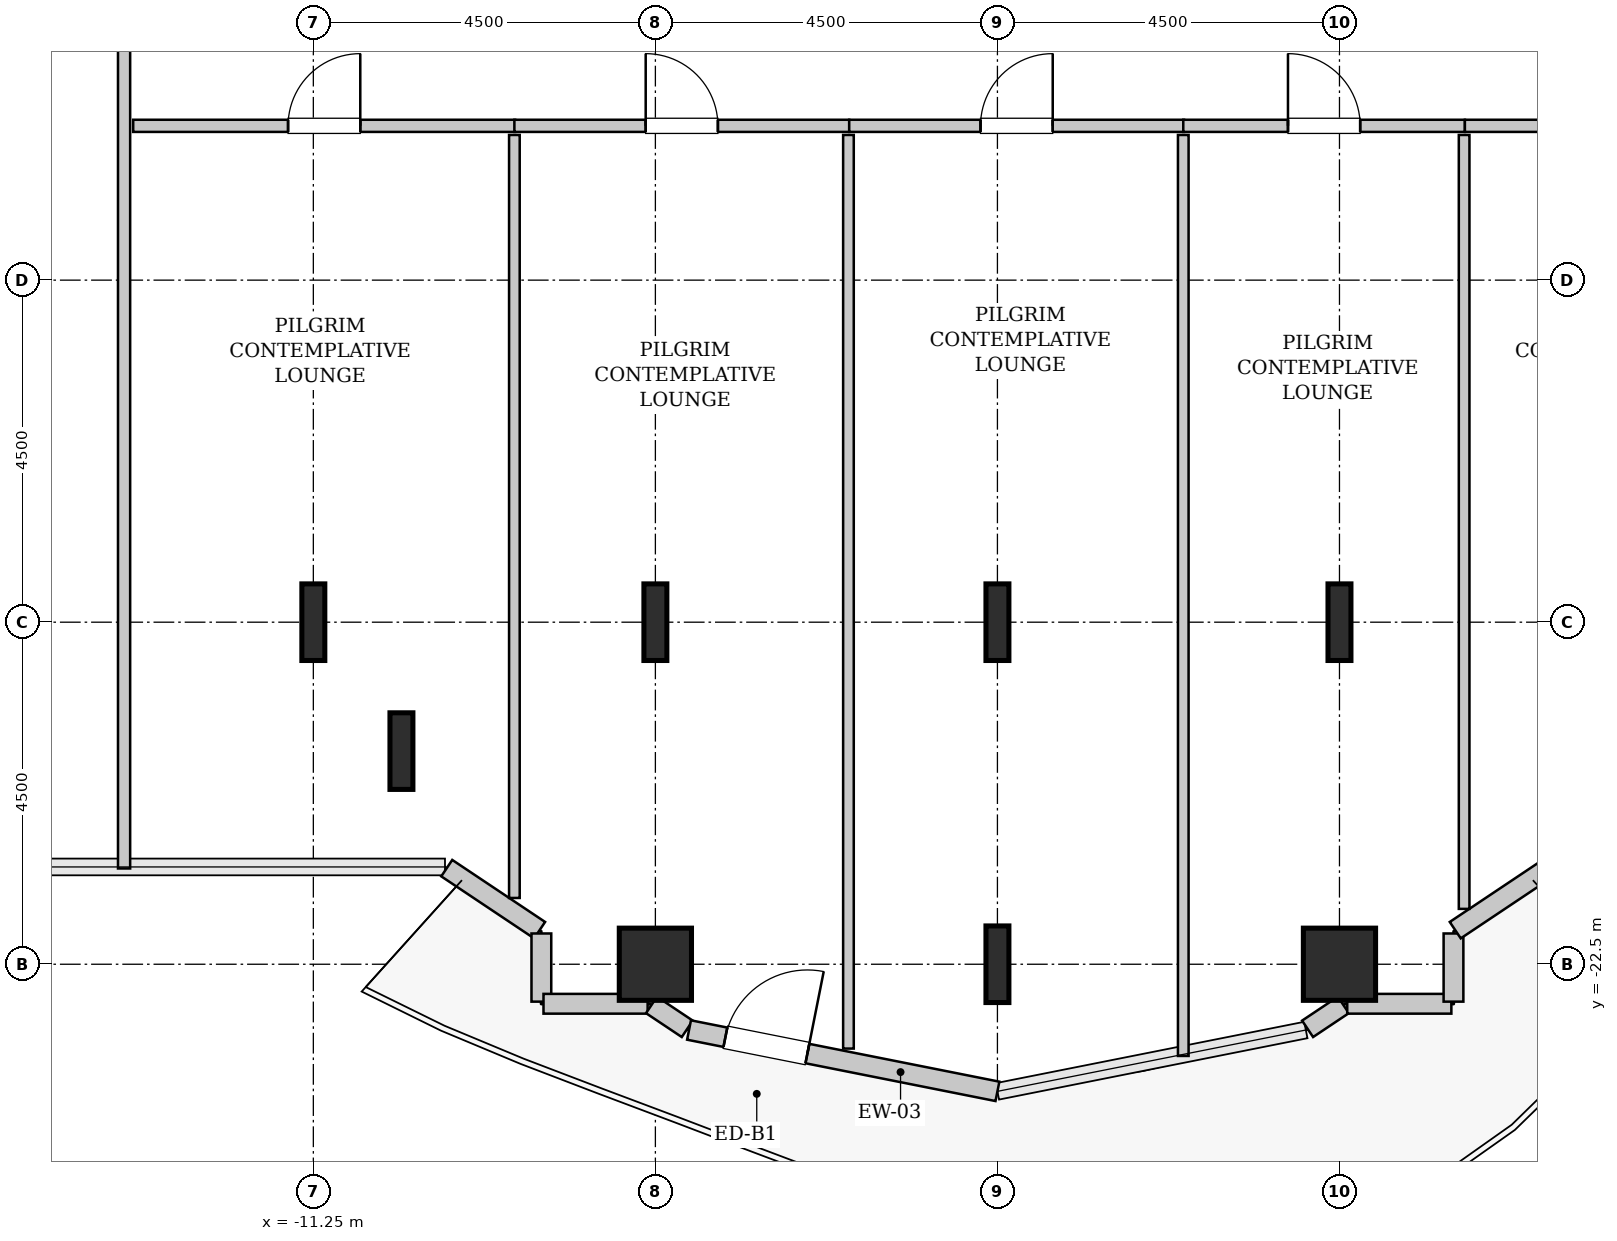
"""IFC4 building model, lengths in metres.
Left out: names, types, materials, properties, quantities, classifications, styles, units other than length and angle.
Written with IfcOpenShell. Run it as: python <this file> out.ifc"""

import sys

from ifc_helpers import new_model, si_unit, direction, frame, frame_2d, origin, origin_2d, place, context, subcontext, project, spatial, rectangle, hollow_rectangle, i_section, extrude, source, transform, mapped, element, fill, save


model = new_model("IFC4")
c1 = context("Model", 3, precision=1e-05, world=origin(), true_north=direction((0.0, 1.0)))
c2 = subcontext(c1, "Body", "Model", "MODEL_VIEW")
j1 = project(units=[si_unit("LENGTHUNIT", "METRE"), si_unit("PLANEANGLEUNIT", "RADIAN")], contexts=[c1])
p1 = place(None, origin())
s1 = spatial("IfcSite", under=j1, at=p1, CompositionType="ELEMENT")
p2 = place(p1, origin())
s2 = spatial("IfcBuilding", under=s1, at=p2, CompositionType="ELEMENT")
p3 = place(p2, frame((0.0, 0.0, 44.4)))
s3 = spatial("IfcBuildingStorey", under=s2, at=p3, CompositionType="ELEMENT", Elevation=44.4)
m1 = source(origin(), c2, "Body", "SweptSolid", [
    extrude(i_section(OverallWidth=0.302, OverallDepth=1.008, WebThickness=0.021, FlangeThickness=0.04, FilletRadius=0.03, at=origin_2d()), origin(), (0.0, 0.0, 1.0), 3.8),
])
for number, where, z_axis, x_axis in (
    (1, (-11.25, -18.0, 0.0), (0.0, 0.0, 1.0), (1.0, 0.0, 0.0)),
    (2, (-10.091, -19.696, 0.0), (0.0, 0.0, 1.0), (1.0, 0.0, 0.0)),
):
    element("IfcColumn", number, at=place(p3, frame(where, z_axis=z_axis, x_axis=x_axis)), inside=s3, PredefinedType="COLUMN", context=c2, shape_type="MappedRepresentation", body=[
        mapped(m1, transform((0.0, 0.0, 0.0), x_axis=(1.0, 0.0, 0.0), y_axis=(0.0, 1.0, 0.0), z_axis=(0.0, 0.0, 1.0), scale=1.0)),
    ])
m2 = source(origin(), c2, "Body", "SweptSolid", [
    extrude(hollow_rectangle(XDim=0.95, YDim=0.95, WallThickness=0.045, InnerFilletRadius=0.045, OuterFilletRadius=0.09, at=origin_2d()), origin(), (0.0, 0.0, 1.0), 3.8),
])
p4 = place(p3, frame((-6.75, -22.5, 0.0), z_axis=(0.0, 0.0, 1.0), x_axis=(1.0, 0.0, 0.0)))
e3 = element("IfcColumn", 3, at=p4, inside=s3, PredefinedType="COLUMN", context=c2, shape_type="MappedRepresentation", body=[
    mapped(m2, transform((0.0, 0.0, 0.0), x_axis=(1.0, 0.0, 0.0), y_axis=(0.0, 1.0, 0.0), z_axis=(0.0, 0.0, 1.0), scale=1.0)),
])
for number, where, z_axis, x_axis in (
    (4, (-6.75, -18.0, 0.0), (0.0, 0.0, 1.0), (1.0, 0.0, 0.0)),
    (5, (-2.25, -22.5, 0.0), (0.0, 0.0, 1.0), (1.0, 0.0, 0.0)),
    (6, (-2.25, -18.0, 0.0), (0.0, 0.0, 1.0), (1.0, 0.0, 0.0)),
):
    element("IfcColumn", number, at=place(p3, frame(where, z_axis=z_axis, x_axis=x_axis)), inside=s3, PredefinedType="COLUMN", context=c2, shape_type="MappedRepresentation", body=[
        mapped(m1, transform((0.0, 0.0, 0.0), x_axis=(1.0, 0.0, 0.0), y_axis=(0.0, 1.0, 0.0), z_axis=(0.0, 0.0, 1.0), scale=1.0)),
    ])
p5 = place(p3, frame((2.25, -22.5, 0.0), z_axis=(0.0, 0.0, 1.0), x_axis=(1.0, 0.0, 0.0)))
e7 = element("IfcColumn", 7, at=p5, inside=s3, PredefinedType="COLUMN", context=c2, shape_type="MappedRepresentation", body=[
    mapped(m2, transform((0.0, 0.0, 0.0), x_axis=(1.0, 0.0, 0.0), y_axis=(0.0, 1.0, 0.0), z_axis=(0.0, 0.0, 1.0), scale=1.0)),
])
p6 = place(p3, frame((2.25, -18.0, 0.0), z_axis=(0.0, 0.0, 1.0), x_axis=(1.0, 0.0, 0.0)))
e8 = element("IfcColumn", 8, at=p6, inside=s3, PredefinedType="COLUMN", context=c2, shape_type="MappedRepresentation", body=[
    mapped(m1, transform((0.0, 0.0, 0.0), x_axis=(1.0, 0.0, 0.0), y_axis=(0.0, 1.0, 0.0), z_axis=(0.0, 0.0, 1.0), scale=1.0)),
])
m3 = source(origin(), c2, "Body", "SweptSolid", [
    extrude(rectangle(XDim=1.469, YDim=0.26, at=frame_2d((0.734, 0.0))), origin(), (0.0, 0.0, 1.0), 3.55),
])
p7 = place(p3, frame((-9.495, -21.236, 0.0), z_axis=(0.0, 0.0, 1.0), x_axis=(0.831461760506, -0.555581983884, 0.0)))
e9 = element("IfcWall", 9, at=p7, inside=s3, PredefinedType="SOLIDWALL", context=c2, shape_type="MappedRepresentation", body=[
    mapped(m3, transform((0.0, 0.0, 0.0), x_axis=(1.0, 0.0, 0.0), y_axis=(0.0, 1.0, 0.0), z_axis=(0.0, 0.0, 1.0), scale=1.0)),
])
m4 = source(origin(), c2, "Body", "SweptSolid", [
    extrude(rectangle(XDim=0.897, YDim=0.26, at=frame_2d((0.448, 0.0))), origin(), (0.0, 0.0, 1.0), 3.55),
])
p8 = place(p3, frame((-8.25, -22.095, 0.0), z_axis=(0.0, 0.0, 1.0), x_axis=(0.0, -1.0, 0.0)))
e10 = element("IfcWall", 10, at=p8, inside=s3, PredefinedType="SOLIDWALL", context=c2, shape_type="MappedRepresentation", body=[
    mapped(m4, transform((0.0, 0.0, 0.0), x_axis=(1.0, 0.0, 0.0), y_axis=(0.0, 1.0, 0.0), z_axis=(0.0, 0.0, 1.0), scale=1.0)),
])
m5 = source(origin(), c2, "Body", "SweptSolid", [
    extrude(rectangle(XDim=1.37, YDim=0.26, at=frame_2d((0.685, 0.0))), origin(), (0.0, 0.0, 1.0), 3.55),
])
p9 = place(p3, frame((-8.222, -23.02, 0.0), z_axis=(0.0, 0.0, 1.0), x_axis=(1.0, 0.0, 0.0)))
e11 = element("IfcWall", 11, at=p9, inside=s3, PredefinedType="SOLIDWALL", context=c2, shape_type="MappedRepresentation", body=[
    mapped(m5, transform((0.0, 0.0, 0.0), x_axis=(1.0, 0.0, 0.0), y_axis=(0.0, 1.0, 0.0), z_axis=(0.0, 0.0, 1.0), scale=1.0)),
])
m6 = source(origin(), c2, "Body", "SweptSolid", [
    extrude(rectangle(XDim=0.565, YDim=0.26, at=frame_2d((0.283, 0.0))), origin(), (0.0, 0.0, 1.0), 3.55),
])
p10 = place(p3, frame((-6.801, -23.036, 0.0), z_axis=(0.0, 0.0, 1.0), x_axis=(0.831651492666, -0.555297933317, 0.0)))
e12 = element("IfcWall", 12, at=p10, inside=s3, PredefinedType="SOLIDWALL", context=c2, shape_type="MappedRepresentation", body=[
    mapped(m6, transform((0.0, 0.0, 0.0), x_axis=(1.0, 0.0, 0.0), y_axis=(0.0, 1.0, 0.0), z_axis=(0.0, 0.0, 1.0), scale=1.0)),
])
m7 = source(origin(), c2, "Body", "SweptSolid", [
    extrude(rectangle(XDim=4.137, YDim=0.26, at=frame_2d((2.068, 0.0))), origin(), (0.0, 0.0, 1.0), 3.55),
])
p11 = place(p3, frame((-6.307, -23.365, 0.0), z_axis=(0.0, 0.0, 1.0), x_axis=(0.980782170794, -0.195105954428, 0.0)))
e13 = element("IfcWall", 13, at=p11, inside=s3, PredefinedType="SOLIDWALL", context=c2, shape_type="MappedRepresentation", body=[
    mapped(m7, transform((0.0, 0.0, 0.0), x_axis=(1.0, 0.0, 0.0), y_axis=(0.0, 1.0, 0.0), z_axis=(0.0, 0.0, 1.0), scale=1.0)),
])
p12 = place(p11, frame((0.488, 0.0, 0.0)))
e14 = element("IfcOpeningElement", 14, at=p12, cuts=e13, PredefinedType="OPENING", context=c2, shape_type="SweptSolid", body=[
    extrude(rectangle(XDim=1.1, YDim=2.2, at=frame_2d((0.55, 1.1))), frame((0.0, 0.14, 0.0), z_axis=(0.0, -1.0, 0.0), x_axis=(1.0, 0.0, 0.0)), (0.0, 0.0, 1.0), 0.28),
])
p13 = place(p3, frame((1.831, -23.35, 0.0), z_axis=(0.0, 0.0, 1.0), x_axis=(0.831651492666, 0.555297933317, 0.0)))
e15 = element("IfcWall", 15, at=p13, inside=s3, PredefinedType="SOLIDWALL", context=c2, shape_type="MappedRepresentation", body=[
    mapped(m6, transform((0.0, 0.0, 0.0), x_axis=(1.0, 0.0, 0.0), y_axis=(0.0, 1.0, 0.0), z_axis=(0.0, 0.0, 1.0), scale=1.0)),
])
p14 = place(p3, frame((2.352, -23.02, 0.0), z_axis=(0.0, 0.0, 1.0), x_axis=(1.0, 0.0, 0.0)))
e16 = element("IfcWall", 16, at=p14, inside=s3, PredefinedType="SOLIDWALL", context=c2, shape_type="MappedRepresentation", body=[
    mapped(m5, transform((0.0, 0.0, 0.0), x_axis=(1.0, 0.0, 0.0), y_axis=(0.0, 1.0, 0.0), z_axis=(0.0, 0.0, 1.0), scale=1.0)),
])
p15 = place(p3, frame((3.75, -22.992, 0.0), z_axis=(0.0, 0.0, 1.0), x_axis=(0.0, 1.0, 0.0)))
e17 = element("IfcWall", 17, at=p15, inside=s3, PredefinedType="SOLIDWALL", context=c2, shape_type="MappedRepresentation", body=[
    mapped(m4, transform((0.0, 0.0, 0.0), x_axis=(1.0, 0.0, 0.0), y_axis=(0.0, 1.0, 0.0), z_axis=(0.0, 0.0, 1.0), scale=1.0)),
])
p16 = place(p3, frame((3.773, -22.052, 0.0), z_axis=(0.0, 0.0, 1.0), x_axis=(0.831461760506, 0.555581983884, 0.0)))
e18 = element("IfcWall", 18, at=p16, inside=s3, PredefinedType="SOLIDWALL", context=c2, shape_type="MappedRepresentation", body=[
    mapped(m3, transform((0.0, 0.0, 0.0), x_axis=(1.0, 0.0, 0.0), y_axis=(0.0, 1.0, 0.0), z_axis=(0.0, 0.0, 1.0), scale=1.0)),
])
m8 = source(origin(), c2, "Body", "SweptSolid", [
    extrude(rectangle(XDim=12.745, YDim=0.16, at=frame_2d((6.373, 0.0))), origin(), (0.0, 0.0, 1.0), 3.535),
])
p17 = place(p3, frame((-13.74, -21.24, 0.0), z_axis=(0.0, 0.0, 1.0), x_axis=(0.0, 1.0, 0.0)))
e19 = element("IfcWall", 19, at=p17, inside=s3, PredefinedType="PARTITIONING", context=c2, shape_type="MappedRepresentation", body=[
    mapped(m8, transform((0.0, 0.0, 0.0), x_axis=(1.0, 0.0, 0.0), y_axis=(0.0, 1.0, 0.0), z_axis=(0.0, 0.0, 1.0), scale=1.0)),
])
p18 = place(p17, frame((10.762, 0.0, 0.0)))
e20 = element("IfcOpeningElement", 20, at=p18, cuts=e19, PredefinedType="OPENING", context=c2, shape_type="SweptSolid", body=[
    extrude(rectangle(XDim=0.95, YDim=2.1, at=frame_2d((0.475, 1.05))), frame((0.0, 0.09, 0.0), z_axis=(0.0, -1.0, 0.0), x_axis=(1.0, 0.0, 0.0)), (0.0, 0.0, 1.0), 0.18),
])
m9 = source(origin(), c2, "Body", "SweptSolid", [
    extrude(rectangle(XDim=5.025, YDim=0.16, at=frame_2d((2.513, 0.0))), origin(), (0.0, 0.0, 1.0), 3.535),
])
p19 = place(p3, frame((-13.62, -11.47, 0.0), z_axis=(0.0, 0.0, 1.0), x_axis=(1.0, 0.0, 0.0)))
e21 = element("IfcWall", 21, at=p19, inside=s3, PredefinedType="PARTITIONING", context=c2, shape_type="MappedRepresentation", body=[
    mapped(m9, transform((0.0, 0.0, 0.0), x_axis=(1.0, 0.0, 0.0), y_axis=(0.0, 1.0, 0.0), z_axis=(0.0, 0.0, 1.0), scale=1.0)),
])
p20 = place(p19, frame((2.038, 0.0, 0.0)))
e22 = element("IfcOpeningElement", 22, at=p20, cuts=e21, PredefinedType="OPENING", context=c2, shape_type="SweptSolid", body=[
    extrude(rectangle(XDim=0.95, YDim=2.1, at=frame_2d((0.475, 1.05))), frame((0.0, 0.09, 0.0), z_axis=(0.0, -1.0, 0.0), x_axis=(1.0, 0.0, 0.0)), (0.0, 0.0, 1.0), 0.18),
])
m10 = source(origin(), c2, "Body", "SweptSolid", [
    extrude(rectangle(XDim=10.038, YDim=0.14, at=frame_2d((5.019, 0.0))), origin(), (0.0, 0.0, 1.0), 3.535),
])
p21 = place(p3, frame((-8.605, -21.628, 0.0), z_axis=(0.0, 0.0, 1.0), x_axis=(0.0, 1.0, 0.0)))
e23 = element("IfcWall", 23, at=p21, inside=s3, PredefinedType="PARTITIONING", context=c2, shape_type="MappedRepresentation", body=[
    mapped(m10, transform((0.0, 0.0, 0.0), x_axis=(1.0, 0.0, 0.0), y_axis=(0.0, 1.0, 0.0), z_axis=(0.0, 0.0, 1.0), scale=1.0)),
])
m11 = source(origin(), c2, "Body", "SweptSolid", [
    extrude(rectangle(XDim=4.405, YDim=0.16, at=frame_2d((2.203, 0.0))), origin(), (0.0, 0.0, 1.0), 3.535),
])
p22 = place(p3, frame((-8.605, -11.47, 0.0), z_axis=(0.0, 0.0, 1.0), x_axis=(1.0, 0.0, 0.0)))
e24 = element("IfcWall", 24, at=p22, inside=s3, PredefinedType="PARTITIONING", context=c2, shape_type="MappedRepresentation", body=[
    mapped(m11, transform((0.0, 0.0, 0.0), x_axis=(1.0, 0.0, 0.0), y_axis=(0.0, 1.0, 0.0), z_axis=(0.0, 0.0, 1.0), scale=1.0)),
])
p23 = place(p22, frame((1.728, 0.0, 0.0)))
e25 = element("IfcOpeningElement", 25, at=p23, cuts=e24, PredefinedType="OPENING", context=c2, shape_type="SweptSolid", body=[
    extrude(rectangle(XDim=0.95, YDim=2.1, at=frame_2d((0.475, 1.05))), frame((0.0, 0.09, 0.0), z_axis=(0.0, -1.0, 0.0), x_axis=(1.0, 0.0, 0.0)), (0.0, 0.0, 1.0), 0.18),
])
m12 = source(origin(), c2, "Body", "SweptSolid", [
    extrude(rectangle(XDim=12.019, YDim=0.14, at=frame_2d((6.01, 0.0))), origin(), (0.0, 0.0, 1.0), 3.535),
])
p24 = place(p3, frame((-4.21, -23.609, 0.0), z_axis=(0.0, 0.0, 1.0), x_axis=(0.0, 1.0, 0.0)))
e26 = element("IfcWall", 26, at=p24, inside=s3, PredefinedType="PARTITIONING", context=c2, shape_type="MappedRepresentation", body=[
    mapped(m12, transform((0.0, 0.0, 0.0), x_axis=(1.0, 0.0, 0.0), y_axis=(0.0, 1.0, 0.0), z_axis=(0.0, 0.0, 1.0), scale=1.0)),
])
p25 = place(p3, frame((-4.2, -11.47, 0.0), z_axis=(0.0, 0.0, 1.0), x_axis=(1.0, 0.0, 0.0)))
e27 = element("IfcWall", 27, at=p25, inside=s3, PredefinedType="PARTITIONING", context=c2, shape_type="MappedRepresentation", body=[
    mapped(m11, transform((0.0, 0.0, 0.0), x_axis=(1.0, 0.0, 0.0), y_axis=(0.0, 1.0, 0.0), z_axis=(0.0, 0.0, 1.0), scale=1.0)),
])
p26 = place(p25, frame((1.728, 0.0, 0.0)))
e28 = element("IfcOpeningElement", 28, at=p26, cuts=e27, PredefinedType="OPENING", context=c2, shape_type="SweptSolid", body=[
    extrude(rectangle(XDim=0.95, YDim=2.1, at=frame_2d((0.475, 1.05))), frame((0.0, 0.09, 0.0), z_axis=(0.0, -1.0, 0.0), x_axis=(1.0, 0.0, 0.0)), (0.0, 0.0, 1.0), 0.18),
])
m13 = source(origin(), c2, "Body", "SweptSolid", [
    extrude(rectangle(XDim=12.116, YDim=0.14, at=frame_2d((6.058, 0.0))), origin(), (0.0, 0.0, 1.0), 3.535),
])
p27 = place(p3, frame((0.195, -23.706, 0.0), z_axis=(0.0, 0.0, 1.0), x_axis=(0.0, 1.0, 0.0)))
e29 = element("IfcWall", 29, at=p27, inside=s3, PredefinedType="PARTITIONING", context=c2, shape_type="MappedRepresentation", body=[
    mapped(m13, transform((0.0, 0.0, 0.0), x_axis=(1.0, 0.0, 0.0), y_axis=(0.0, 1.0, 0.0), z_axis=(0.0, 0.0, 1.0), scale=1.0)),
])
m14 = source(origin(), c2, "Body", "SweptSolid", [
    extrude(rectangle(XDim=3.705, YDim=0.16, at=frame_2d((1.853, 0.0))), origin(), (0.0, 0.0, 1.0), 3.535),
])
p28 = place(p3, frame((0.195, -11.47, 0.0), z_axis=(0.0, 0.0, 1.0), x_axis=(1.0, 0.0, 0.0)))
e30 = element("IfcWall", 30, at=p28, inside=s3, PredefinedType="PARTITIONING", context=c2, shape_type="MappedRepresentation", body=[
    mapped(m14, transform((0.0, 0.0, 0.0), x_axis=(1.0, 0.0, 0.0), y_axis=(0.0, 1.0, 0.0), z_axis=(0.0, 0.0, 1.0), scale=1.0)),
])
p29 = place(p28, frame((1.377, 0.0, 0.0)))
e31 = element("IfcOpeningElement", 31, at=p29, cuts=e30, PredefinedType="OPENING", context=c2, shape_type="SweptSolid", body=[
    extrude(rectangle(XDim=0.95, YDim=2.1, at=frame_2d((0.475, 1.05))), frame((0.0, 0.09, 0.0), z_axis=(0.0, -1.0, 0.0), x_axis=(1.0, 0.0, 0.0)), (0.0, 0.0, 1.0), 0.18),
])
m15 = source(origin(), c2, "Body", "SweptSolid", [
    extrude(rectangle(XDim=10.182, YDim=0.14, at=frame_2d((5.091, 0.0))), origin(), (0.0, 0.0, 1.0), 3.535),
])
p30 = place(p3, frame((3.89, -21.772, 0.0), z_axis=(0.0, 0.0, 1.0), x_axis=(0.0, 1.0, 0.0)))
e32 = element("IfcWall", 32, at=p30, inside=s3, PredefinedType="PARTITIONING", context=c2, shape_type="MappedRepresentation", body=[
    mapped(m15, transform((0.0, 0.0, 0.0), x_axis=(1.0, 0.0, 0.0), y_axis=(0.0, 1.0, 0.0), z_axis=(0.0, 0.0, 1.0), scale=1.0)),
])
m16 = source(origin(), c2, "Body", "SweptSolid", [
    extrude(rectangle(XDim=3.705, YDim=0.16, at=frame_2d((1.853, 0.0))), origin(), (0.0, 0.0, 1.0), 3.535),
])
p31 = place(p3, frame((3.9, -11.47, 0.0), z_axis=(0.0, 0.0, 1.0), x_axis=(1.0, 0.0, 0.0)))
e33 = element("IfcWall", 33, at=p31, inside=s3, PredefinedType="PARTITIONING", context=c2, shape_type="MappedRepresentation", body=[
    mapped(m16, transform((0.0, 0.0, 0.0), x_axis=(1.0, 0.0, 0.0), y_axis=(0.0, 1.0, 0.0), z_axis=(0.0, 0.0, 1.0), scale=1.0)),
])
p32 = place(p31, frame((1.377, 0.0, 0.0)))
e34 = element("IfcOpeningElement", 34, at=p32, cuts=e33, PredefinedType="OPENING", context=c2, shape_type="SweptSolid", body=[
    extrude(rectangle(XDim=0.95, YDim=2.1, at=frame_2d((0.475, 1.05))), frame((0.0, 0.09, 0.0), z_axis=(0.0, -1.0, 0.0), x_axis=(1.0, 0.0, 0.0)), (0.0, 0.0, 1.0), 0.18),
])
m17 = source(origin(), c2, "Body", "SweptSolid", [
    extrude(rectangle(XDim=1.1, YDim=2.2, at=frame_2d((0.55, 1.1))), frame((0.0, 0.025, 0.0), z_axis=(0.0, -1.0, 0.0), x_axis=(1.0, 0.0, 0.0)), (0.0, 0.0, 1.0), 0.05),
])
p33 = place(p12, origin())
e35 = element("IfcDoor", 35, at=p33, inside=s3, OperationType="SINGLE_SWING_RIGHT", PredefinedType="DOOR", context=c2, shape_type="MappedRepresentation", body=[
    mapped(m17, transform((0.0, 0.0, 0.0), x_axis=(1.0, 0.0, 0.0), y_axis=(0.0, 1.0, 0.0), z_axis=(0.0, 0.0, 1.0), scale=1.0)),
])
fill(e14, e35)
m18 = source(origin(), c2, "Body", "SweptSolid", [
    extrude(rectangle(XDim=0.95, YDim=2.1, at=frame_2d((0.475, 1.05))), frame((0.0, 0.025, 0.0), z_axis=(0.0, -1.0, 0.0), x_axis=(1.0, 0.0, 0.0)), (0.0, 0.0, 1.0), 0.05),
])
p34 = place(p20, origin())
e36 = element("IfcDoor", 36, at=p34, inside=s3, OperationType="SINGLE_SWING_RIGHT", PredefinedType="DOOR", context=c2, shape_type="MappedRepresentation", body=[
    mapped(m18, transform((0.0, 0.0, 0.0), x_axis=(1.0, 0.0, 0.0), y_axis=(0.0, 1.0, 0.0), z_axis=(0.0, 0.0, 1.0), scale=1.0)),
])
fill(e22, e36)
p35 = place(p23, origin())
e37 = element("IfcDoor", 37, at=p35, inside=s3, OperationType="SINGLE_SWING_LEFT", PredefinedType="DOOR", context=c2, shape_type="MappedRepresentation", body=[
    mapped(m18, transform((0.0, 0.0, 0.0), x_axis=(1.0, 0.0, 0.0), y_axis=(0.0, 1.0, 0.0), z_axis=(0.0, 0.0, 1.0), scale=1.0)),
])
fill(e25, e37)
p36 = place(p26, origin())
e38 = element("IfcDoor", 38, at=p36, inside=s3, OperationType="SINGLE_SWING_RIGHT", PredefinedType="DOOR", context=c2, shape_type="MappedRepresentation", body=[
    mapped(m18, transform((0.0, 0.0, 0.0), x_axis=(1.0, 0.0, 0.0), y_axis=(0.0, 1.0, 0.0), z_axis=(0.0, 0.0, 1.0), scale=1.0)),
])
fill(e28, e38)
p37 = place(p29, origin())
e39 = element("IfcDoor", 39, at=p37, inside=s3, OperationType="SINGLE_SWING_LEFT", PredefinedType="DOOR", context=c2, shape_type="MappedRepresentation", body=[
    mapped(m18, transform((0.0, 0.0, 0.0), x_axis=(1.0, 0.0, 0.0), y_axis=(0.0, 1.0, 0.0), z_axis=(0.0, 0.0, 1.0), scale=1.0)),
])
fill(e31, e39)
save(model, sys.argv[1])
